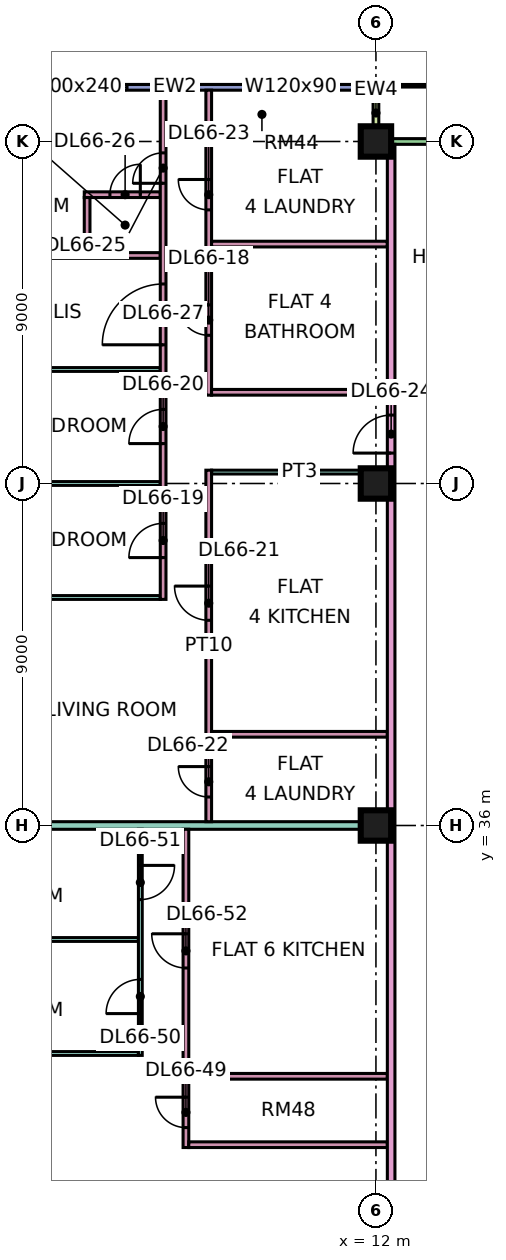
"""IFC4 building model, lengths in metres.
Left out: names, types, materials, properties, quantities, classifications, styles, units other than length and angle.
Written with IfcOpenShell. Run it as: python <this file> out.ifc"""

import sys

from ifc_helpers import new_model, si_unit, direction, frame, frame_2d, origin, origin_2d, place, context, subcontext, project, spatial, rectangle, extrude, element, fill, save


model = new_model("IFC4")
c1 = context("Model", 3, precision=1e-05, world=origin(), true_north=direction((0.0, 1.0)))
c2 = subcontext(c1, "Body", "Model", "MODEL_VIEW")
j1 = project(units=[si_unit("LENGTHUNIT", "METRE"), si_unit("PLANEANGLEUNIT", "RADIAN")], contexts=[c1])
p1 = place(None, origin())
s1 = spatial("IfcSite", under=j1, at=p1, CompositionType="ELEMENT")
p2 = place(p1, origin())
s2 = spatial("IfcBuilding", under=s1, at=p2, CompositionType="ELEMENT")
p3 = place(p2, frame((0.0, 0.0, 284.65)))
s3 = spatial("IfcBuildingStorey", under=s2, at=p3, CompositionType="ELEMENT", Elevation=284.65)
for number, where, z_axis, x_axis in (
    (1, (12.0, 36.0, 0.0), (0.0, 0.0, 1.0), (1.0, 0.0, 0.0)),
    (2, (12.0, 45.0, 0.0), (0.0, 0.0, 1.0), (1.0, 0.0, 0.0)),
    (3, (12.0, 54.0, 0.0), (0.0, 0.0, 1.0), (1.0, 0.0, 0.0)),
):
    element("IfcColumn", number, at=place(p3, frame(where, z_axis=z_axis, x_axis=x_axis)), inside=s3, PredefinedType="COLUMN", context=c2, shape_type="SweptSolid", body=[
        extrude(rectangle(XDim=0.8, YDim=0.8, at=origin_2d()), origin(), (0.0, 0.0, 1.0), 3.75),
    ])
p4 = place(p3, frame((22.425, 54.0, 0.0), z_axis=(0.0, 0.0, 1.0), x_axis=(-1.0, 0.0, 0.0)))
e4 = element("IfcWall", 4, at=p4, inside=s3, PredefinedType="SOLIDWALL", context=c2, shape_type="SweptSolid", body=[
    extrude(rectangle(XDim=10.35, YDim=0.15, at=frame_2d((5.175, 0.0))), origin(), (0.0, 0.0, 1.0), 3.35),
])
p5 = place(p4, frame((1.012, 0.0, 0.45)))
e5 = element("IfcOpeningElement", 5, at=p5, cuts=e4, PredefinedType="OPENING", context=c2, shape_type="SweptSolid", body=[
    extrude(rectangle(XDim=4.8, YDim=2.4, at=frame_2d((2.4, 1.2))), frame((0.0, 0.085, 0.0), z_axis=(0.0, -1.0, 0.0), x_axis=(1.0, 0.0, 0.0)), (0.0, 0.0, 1.0), 0.17),
])
p6 = place(p3, frame((12.0, 55.5, 0.0), z_axis=(0.0, 0.0, 1.0), x_axis=(0.0, -1.0, 0.0)))
e6 = element("IfcWall", 6, at=p6, inside=s3, PredefinedType="SOLIDWALL", context=c2, shape_type="SweptSolid", body=[
    extrude(rectangle(XDim=1.5, YDim=0.15, at=frame_2d((0.75, 0.0))), origin(), (0.0, 0.0, 1.0), 3.35),
])
p7 = place(p3, frame((11.925, 55.425, 0.0), z_axis=(0.0, 0.0, 1.0), x_axis=(-1.0, 0.0, 0.0)))
e7 = element("IfcWall", 7, at=p7, inside=s3, PredefinedType="SOLIDWALL", context=c2, shape_type="SweptSolid", body=[
    extrude(rectangle(XDim=10.425, YDim=0.15, at=frame_2d((5.212, 0.0))), origin(), (0.0, 0.0, 1.0), 3.35),
])
p8 = place(p7, frame((1.562, 0.0, 1.7)))
e8 = element("IfcOpeningElement", 8, at=p8, cuts=e7, PredefinedType="OPENING", context=c2, shape_type="SweptSolid", body=[
    extrude(rectangle(XDim=1.2, YDim=0.9, at=frame_2d((0.6, 0.45))), frame((0.0, 0.085, 0.0), z_axis=(0.0, -1.0, 0.0), x_axis=(1.0, 0.0, 0.0)), (0.0, 0.0, 1.0), 0.17),
])
p9 = place(p7, frame((6.475, 0.0, 0.45)))
e9 = element("IfcOpeningElement", 9, at=p9, cuts=e7, PredefinedType="OPENING", context=c2, shape_type="SweptSolid", body=[
    extrude(rectangle(XDim=3.0, YDim=2.4, at=frame_2d((1.5, 1.2))), frame((0.0, 0.085, 0.0), z_axis=(0.0, -1.0, 0.0), x_axis=(1.0, 0.0, 0.0)), (0.0, 0.0, 1.0), 0.17),
])
p10 = place(p3, frame((-1.351, 33.0, 0.0), z_axis=(0.0, 0.0, 1.0), x_axis=(1.0, 0.0, 0.0)))
e10 = element("IfcWall", 10, at=p10, inside=s3, PredefinedType="PARTITIONING", context=c2, shape_type="SweptSolid", body=[
    extrude(rectangle(XDim=7.101, YDim=0.1, at=frame_2d((3.551, 0.0))), origin(), (0.0, 0.0, 1.0), 3.35),
])
p11 = place(p3, frame((-1.351, 51.0, 0.0), z_axis=(0.0, 0.0, 1.0), x_axis=(1.0, 0.0, 0.0)))
e11 = element("IfcWall", 11, at=p11, inside=s3, PredefinedType="PARTITIONING", context=c2, shape_type="SweptSolid", body=[
    extrude(rectangle(XDim=7.676, YDim=0.15, at=frame_2d((3.838, 0.0))), origin(), (0.0, 0.0, 1.0), 3.35),
])
p12 = place(p3, frame((-1.35, 30.0, 0.0), z_axis=(0.0, 0.0, 1.0), x_axis=(1.0, 0.0, 0.0)))
e12 = element("IfcWall", 12, at=p12, inside=s3, PredefinedType="PARTITIONING", context=c2, shape_type="SweptSolid", body=[
    extrude(rectangle(XDim=7.1, YDim=0.1, at=frame_2d((3.55, 0.0))), origin(), (0.0, 0.0, 1.0), 3.35),
])
p13 = place(p3, frame((0.0, 36.0, 0.0), z_axis=(0.0, 0.0, 1.0), x_axis=(1.0, 0.0, 0.0)))
e13 = element("IfcWall", 13, at=p13, inside=s3, PredefinedType="PARTITIONING", context=c2, shape_type="SweptSolid", body=[
    extrude(rectangle(XDim=12.3, YDim=0.2, at=frame_2d((6.15, 0.0))), origin(), (0.0, 0.0, 1.0), 3.35),
])
p14 = place(p3, frame((0.0, 48.0, 0.0), z_axis=(0.0, 0.0, 1.0), x_axis=(1.0, 0.0, 0.0)))
e14 = element("IfcWall", 14, at=p14, inside=s3, PredefinedType="PARTITIONING", context=c2, shape_type="SweptSolid", body=[
    extrude(rectangle(XDim=6.325, YDim=0.1, at=frame_2d((3.163, 0.0))), origin(), (0.0, 0.0, 1.0), 3.35),
])
for number, where, z_axis, x_axis in (
    (15, (0.074, 42.0, 0.0), (0.0, 0.0, 1.0), (1.0, 0.0, 0.0)),
    (16, (0.074, 45.0, 0.0), (0.0, 0.0, 1.0), (1.0, 0.0, 0.0)),
):
    element("IfcWall", number, at=place(p3, frame(where, z_axis=z_axis, x_axis=x_axis)), inside=s3, PredefinedType="PARTITIONING", context=c2, shape_type="SweptSolid", body=[
        extrude(rectangle(XDim=6.251, YDim=0.1, at=frame_2d((3.125, 0.0))), origin(), (0.0, 0.0, 1.0), 3.35),
    ])
p15 = place(p3, frame((4.325, 52.6, 0.0), z_axis=(0.0, 0.0, 1.0), x_axis=(1.0, 0.0, 0.0)))
e17 = element("IfcWall", 17, at=p15, inside=s3, PredefinedType="PARTITIONING", context=c2, shape_type="SweptSolid", body=[
    extrude(rectangle(XDim=2.0, YDim=0.15, at=frame_2d((1.0, 0.0))), origin(), (0.0, 0.0, 1.0), 3.35),
])
p16 = place(p15, frame((0.675, 0.0, 0.0)))
e18 = element("IfcOpeningElement", 18, at=p16, cuts=e17, PredefinedType="OPENING", context=c2, shape_type="SweptSolid", body=[
    extrude(rectangle(XDim=0.8, YDim=2.1, at=frame_2d((0.4, 1.05))), frame((0.0, 0.085, 0.0), z_axis=(0.0, -1.0, 0.0), x_axis=(1.0, 0.0, 0.0)), (0.0, 0.0, 1.0), 0.17),
])
p17 = place(p3, frame((4.4, 51.075, 0.0), z_axis=(0.0, 0.0, 1.0), x_axis=(0.0, 1.0, 0.0)))
e19 = element("IfcWall", 19, at=p17, inside=s3, PredefinedType="PARTITIONING", context=c2, shape_type="SweptSolid", body=[
    extrude(rectangle(XDim=1.45, YDim=0.15, at=frame_2d((0.725, 0.0))), origin(), (0.0, 0.0, 1.0), 3.35),
])
p18 = place(p3, frame((5.8, 29.95, 0.0), z_axis=(0.0, 0.0, 1.0), x_axis=(0.0, 1.0, 0.0)))
e20 = element("IfcWall", 20, at=p18, inside=s3, PredefinedType="PARTITIONING", context=c2, shape_type="SweptSolid", body=[
    extrude(rectangle(XDim=5.95, YDim=0.1, at=frame_2d((2.975, 0.0))), origin(), (0.0, 0.0, 1.0), 3.35),
])
p19 = place(p18, frame((1.1, 0.0, 0.0)))
e21 = element("IfcOpeningElement", 21, at=p19, cuts=e20, PredefinedType="OPENING", context=c2, shape_type="SweptSolid", body=[
    extrude(rectangle(XDim=0.9, YDim=2.1, at=frame_2d((0.45, 1.05))), frame((0.0, 0.06, 0.0), z_axis=(0.0, -1.0, 0.0), x_axis=(1.0, 0.0, 0.0)), (0.0, 0.0, 1.0), 0.12),
])
p20 = place(p18, frame((4.1, 0.0, 0.0)))
e22 = element("IfcOpeningElement", 22, at=p20, cuts=e20, PredefinedType="OPENING", context=c2, shape_type="SweptSolid", body=[
    extrude(rectangle(XDim=0.9, YDim=2.1, at=frame_2d((0.45, 1.05))), frame((0.0, 0.06, 0.0), z_axis=(0.0, -1.0, 0.0), x_axis=(1.0, 0.0, 0.0)), (0.0, 0.0, 1.0), 0.12),
])
p21 = place(p3, frame((6.4, 41.95, 0.0), z_axis=(0.0, 0.0, 1.0), x_axis=(0.0, 1.0, 0.0)))
e23 = element("IfcWall", 23, at=p21, inside=s3, PredefinedType="PARTITIONING", context=c2, shape_type="SweptSolid", body=[
    extrude(rectangle(XDim=13.4, YDim=0.15, at=frame_2d((6.7, 0.0))), origin(), (0.0, 0.0, 1.0), 3.35),
])
p22 = place(p21, frame((1.1, 0.0, 0.0)))
e24 = element("IfcOpeningElement", 24, at=p22, cuts=e23, PredefinedType="OPENING", context=c2, shape_type="SweptSolid", body=[
    extrude(rectangle(XDim=0.9, YDim=2.1, at=frame_2d((0.45, 1.05))), frame((0.0, 0.085, 0.0), z_axis=(0.0, -1.0, 0.0), x_axis=(1.0, 0.0, 0.0)), (0.0, 0.0, 1.0), 0.17),
])
p23 = place(p21, frame((4.1, 0.0, 0.0)))
e25 = element("IfcOpeningElement", 25, at=p23, cuts=e23, PredefinedType="OPENING", context=c2, shape_type="SweptSolid", body=[
    extrude(rectangle(XDim=0.9, YDim=2.1, at=frame_2d((0.45, 1.05))), frame((0.0, 0.085, 0.0), z_axis=(0.0, -1.0, 0.0), x_axis=(1.0, 0.0, 0.0)), (0.0, 0.0, 1.0), 0.17),
])
p24 = place(p21, frame((10.95, 0.0, 0.0)))
e26 = element("IfcOpeningElement", 26, at=p24, cuts=e23, PredefinedType="OPENING", context=c2, shape_type="SweptSolid", body=[
    extrude(rectangle(XDim=0.8, YDim=2.1, at=frame_2d((0.4, 1.05))), frame((0.0, 0.085, 0.0), z_axis=(0.0, -1.0, 0.0), x_axis=(1.0, 0.0, 0.0)), (0.0, 0.0, 1.0), 0.17),
])
p25 = place(p21, frame((6.7, 0.0, 0.0)))
e27 = element("IfcOpeningElement", 27, at=p25, cuts=e23, PredefinedType="OPENING", context=c2, shape_type="SweptSolid", body=[
    extrude(rectangle(XDim=1.6, YDim=2.1, at=frame_2d((0.8, 1.05))), frame((0.0, 0.085, 0.0), z_axis=(0.0, -1.0, 0.0), x_axis=(1.0, 0.0, 0.0)), (0.0, 0.0, 1.0), 0.17),
])
p26 = place(p3, frame((7.0, 27.525, 0.0), z_axis=(0.0, 0.0, 1.0), x_axis=(0.0, 1.0, 0.0)))
e28 = element("IfcWall", 28, at=p26, inside=s3, PredefinedType="PARTITIONING", context=c2, shape_type="SweptSolid", body=[
    extrude(rectangle(XDim=8.375, YDim=0.15, at=frame_2d((4.188, 0.0))), origin(), (0.0, 0.0, 1.0), 3.35),
])
p27 = place(p26, frame((0.525, 0.0, 0.0)))
e29 = element("IfcOpeningElement", 29, at=p27, cuts=e28, PredefinedType="OPENING", context=c2, shape_type="SweptSolid", body=[
    extrude(rectangle(XDim=0.8, YDim=2.1, at=frame_2d((0.4, 1.05))), frame((0.0, 0.085, 0.0), z_axis=(0.0, -1.0, 0.0), x_axis=(1.0, 0.0, 0.0)), (0.0, 0.0, 1.0), 0.17),
])
p28 = place(p26, frame((4.725, 0.0, 0.0)))
e30 = element("IfcOpeningElement", 30, at=p28, cuts=e28, PredefinedType="OPENING", context=c2, shape_type="SweptSolid", body=[
    extrude(rectangle(XDim=0.9, YDim=2.1, at=frame_2d((0.45, 1.05))), frame((0.0, 0.085, 0.0), z_axis=(0.0, -1.0, 0.0), x_axis=(1.0, 0.0, 0.0)), (0.0, 0.0, 1.0), 0.17),
])
for number, where, z_axis, x_axis in (
    (31, (7.075, 27.6, 0.0), (0.0, 0.0, 1.0), (1.0, 0.0, 0.0)),
    (32, (7.075, 29.4, 0.0), (0.0, 0.0, 1.0), (1.0, 0.0, 0.0)),
):
    element("IfcWall", number, at=place(p3, frame(where, z_axis=z_axis, x_axis=x_axis)), inside=s3, PredefinedType="PARTITIONING", context=c2, shape_type="SweptSolid", body=[
        extrude(rectangle(XDim=5.225, YDim=0.15, at=frame_2d((2.613, 0.0))), origin(), (0.0, 0.0, 1.0), 3.35),
    ])
p29 = place(p3, frame((7.6, 36.1, 0.0), z_axis=(0.0, 0.0, 1.0), x_axis=(0.0, 1.0, 0.0)))
e33 = element("IfcWall", 33, at=p29, inside=s3, PredefinedType="PARTITIONING", context=c2, shape_type="SweptSolid", body=[
    extrude(rectangle(XDim=9.25, YDim=0.15, at=frame_2d((4.625, 0.0))), origin(), (0.0, 0.0, 1.0), 3.35),
])
p30 = place(p29, frame((5.3, 0.0, 0.0)))
e34 = element("IfcOpeningElement", 34, at=p30, cuts=e33, PredefinedType="OPENING", context=c2, shape_type="SweptSolid", body=[
    extrude(rectangle(XDim=0.9, YDim=2.1, at=frame_2d((0.45, 1.05))), frame((0.0, 0.085, 0.0), z_axis=(0.0, -1.0, 0.0), x_axis=(1.0, 0.0, 0.0)), (0.0, 0.0, 1.0), 0.17),
])
p31 = place(p29, frame((0.65, 0.0, 0.0)))
e35 = element("IfcOpeningElement", 35, at=p31, cuts=e33, PredefinedType="OPENING", context=c2, shape_type="SweptSolid", body=[
    extrude(rectangle(XDim=0.8, YDim=2.1, at=frame_2d((0.4, 1.05))), frame((0.0, 0.085, 0.0), z_axis=(0.0, -1.0, 0.0), x_axis=(1.0, 0.0, 0.0)), (0.0, 0.0, 1.0), 0.17),
])
p32 = place(p3, frame((7.6, 47.325, 0.0), z_axis=(0.0, 0.0, 1.0), x_axis=(0.0, 1.0, 0.0)))
e36 = element("IfcWall", 36, at=p32, inside=s3, PredefinedType="PARTITIONING", context=c2, shape_type="SweptSolid", body=[
    extrude(rectangle(XDim=8.025, YDim=0.15, at=frame_2d((4.013, 0.0))), origin(), (0.0, 0.0, 1.0), 3.35),
])
p33 = place(p32, frame((1.575, 0.0, 0.0)))
e37 = element("IfcOpeningElement", 37, at=p33, cuts=e36, PredefinedType="OPENING", context=c2, shape_type="SweptSolid", body=[
    extrude(rectangle(XDim=0.8, YDim=2.1, at=frame_2d((0.4, 1.05))), frame((0.0, 0.085, 0.0), z_axis=(0.0, -1.0, 0.0), x_axis=(1.0, 0.0, 0.0)), (0.0, 0.0, 1.0), 0.17),
])
p34 = place(p32, frame((4.875, 0.0, 0.0)))
e38 = element("IfcOpeningElement", 38, at=p34, cuts=e36, PredefinedType="OPENING", context=c2, shape_type="SweptSolid", body=[
    extrude(rectangle(XDim=0.8, YDim=2.1, at=frame_2d((0.4, 1.05))), frame((0.0, 0.085, 0.0), z_axis=(0.0, -1.0, 0.0), x_axis=(1.0, 0.0, 0.0)), (0.0, 0.0, 1.0), 0.17),
])
p35 = place(p3, frame((7.675, 38.4, 0.0), z_axis=(0.0, 0.0, 1.0), x_axis=(1.0, 0.0, 0.0)))
e39 = element("IfcWall", 39, at=p35, inside=s3, PredefinedType="PARTITIONING", context=c2, shape_type="SweptSolid", body=[
    extrude(rectangle(XDim=4.625, YDim=0.15, at=frame_2d((2.312, 0.0))), origin(), (0.0, 0.0, 1.0), 3.35),
])
p36 = place(p3, frame((7.675, 45.3, 0.0), z_axis=(0.0, 0.0, 1.0), x_axis=(1.0, 0.0, 0.0)))
e40 = element("IfcWall", 40, at=p36, inside=s3, PredefinedType="PARTITIONING", context=c2, shape_type="SweptSolid", body=[
    extrude(rectangle(XDim=4.625, YDim=0.1, at=frame_2d((2.312, 0.0))), origin(), (0.0, 0.0, 1.0), 3.35),
])
for number, where, z_axis, x_axis in (
    (41, (7.675, 47.4, 0.0), (0.0, 0.0, 1.0), (1.0, 0.0, 0.0)),
    (42, (7.675, 51.3, 0.0), (0.0, 0.0, 1.0), (1.0, 0.0, 0.0)),
):
    element("IfcWall", number, at=place(p3, frame(where, z_axis=z_axis, x_axis=x_axis)), inside=s3, PredefinedType="PARTITIONING", context=c2, shape_type="SweptSolid", body=[
        extrude(rectangle(XDim=4.625, YDim=0.15, at=frame_2d((2.312, 0.0))), origin(), (0.0, 0.0, 1.0), 3.35),
    ])
p37 = place(p3, frame((12.4, 20.0, 0.0), z_axis=(0.0, 0.0, 1.0), x_axis=(0.0, 1.0, 0.0)))
e43 = element("IfcWall", 43, at=p37, inside=s3, PredefinedType="PARTITIONING", context=c2, shape_type="SweptSolid", body=[
    extrude(rectangle(XDim=33.926, YDim=0.2, at=frame_2d((16.963, 0.0))), origin(), (0.0, 0.0, 1.0), 3.35),
])
p38 = place(p37, frame((25.8, 0.0, 0.0)))
e44 = element("IfcOpeningElement", 44, at=p38, cuts=e43, PredefinedType="OPENING", context=c2, shape_type="SweptSolid", body=[
    extrude(rectangle(XDim=1.0, YDim=2.1, at=frame_2d((0.5, 1.05))), frame((0.0, 0.11, 0.0), z_axis=(0.0, -1.0, 0.0), x_axis=(1.0, 0.0, 0.0)), (0.0, 0.0, 1.0), 0.22),
])
p39 = place(p37, frame((0.6, 0.0, 0.0)))
e45 = element("IfcOpeningElement", 45, at=p39, cuts=e43, PredefinedType="OPENING", context=c2, shape_type="SweptSolid", body=[
    extrude(rectangle(XDim=1.2, YDim=2.1, at=frame_2d((0.6, 1.05))), frame((0.0, 0.11, 0.0), z_axis=(0.0, -1.0, 0.0), x_axis=(1.0, 0.0, 0.0)), (0.0, 0.0, 1.0), 0.22),
])
p40 = place(p37, frame((4.5, 0.0, 0.0)))
e46 = element("IfcOpeningElement", 46, at=p40, cuts=e43, PredefinedType="OPENING", context=c2, shape_type="SweptSolid", body=[
    extrude(rectangle(XDim=1.0, YDim=2.1, at=frame_2d((0.5, 1.05))), frame((0.0, 0.11, 0.0), z_axis=(0.0, -1.0, 0.0), x_axis=(1.0, 0.0, 0.0)), (0.0, 0.0, 1.0), 0.22),
])
p41 = place(p8, origin())
e47 = element("IfcWindow", 47, at=p41, inside=s3, PartitioningType="SINGLE_PANEL", PredefinedType="WINDOW", context=c2, shape_type="SweptSolid", body=[
    extrude(rectangle(XDim=1.2, YDim=0.9, at=frame_2d((0.6, 0.45))), frame((0.0, 0.03, 0.0), z_axis=(0.0, -1.0, 0.0), x_axis=(1.0, 0.0, 0.0)), (0.0, 0.0, 1.0), 0.06),
])
fill(e8, e47)
p42 = place(p9, origin())
e48 = element("IfcWindow", 48, at=p42, inside=s3, PartitioningType="SINGLE_PANEL", PredefinedType="WINDOW", context=c2, shape_type="SweptSolid", body=[
    extrude(rectangle(XDim=3.0, YDim=2.4, at=frame_2d((1.5, 1.2))), frame((0.0, 0.03, 0.0), z_axis=(0.0, -1.0, 0.0), x_axis=(1.0, 0.0, 0.0)), (0.0, 0.0, 1.0), 0.06),
])
fill(e9, e48)
p43 = place(p33, frame((0.8, 0.0, 0.0), z_axis=(0.0, 0.0, 1.0), x_axis=(-1.0, 0.0, 0.0)))
e49 = element("IfcDoor", 49, at=p43, inside=s3, OperationType="SINGLE_SWING_RIGHT", PredefinedType="DOOR", context=c2, shape_type="SweptSolid", body=[
    extrude(rectangle(XDim=0.8, YDim=2.1, at=frame_2d((0.4, 1.05))), frame((0.0, 0.025, 0.0), z_axis=(0.0, -1.0, 0.0), x_axis=(1.0, 0.0, 0.0)), (0.0, 0.0, 1.0), 0.05),
])
fill(e37, e49)
p44 = place(p22, origin())
e50 = element("IfcDoor", 50, at=p44, inside=s3, OperationType="SINGLE_SWING_LEFT", PredefinedType="DOOR", context=c2, shape_type="SweptSolid", body=[
    extrude(rectangle(XDim=0.9, YDim=2.1, at=frame_2d((0.45, 1.05))), frame((0.0, 0.025, 0.0), z_axis=(0.0, -1.0, 0.0), x_axis=(1.0, 0.0, 0.0)), (0.0, 0.0, 1.0), 0.05),
])
fill(e24, e50)
p45 = place(p23, origin())
e51 = element("IfcDoor", 51, at=p45, inside=s3, OperationType="SINGLE_SWING_LEFT", PredefinedType="DOOR", context=c2, shape_type="SweptSolid", body=[
    extrude(rectangle(XDim=0.9, YDim=2.1, at=frame_2d((0.45, 1.05))), frame((0.0, 0.025, 0.0), z_axis=(0.0, -1.0, 0.0), x_axis=(1.0, 0.0, 0.0)), (0.0, 0.0, 1.0), 0.05),
])
fill(e25, e51)
p46 = place(p30, frame((0.9, 0.0, 0.0), z_axis=(0.0, 0.0, 1.0), x_axis=(-1.0, 0.0, 0.0)))
e52 = element("IfcDoor", 52, at=p46, inside=s3, OperationType="SINGLE_SWING_RIGHT", PredefinedType="DOOR", context=c2, shape_type="SweptSolid", body=[
    extrude(rectangle(XDim=0.9, YDim=2.1, at=frame_2d((0.45, 1.05))), frame((0.0, 0.025, 0.0), z_axis=(0.0, -1.0, 0.0), x_axis=(1.0, 0.0, 0.0)), (0.0, 0.0, 1.0), 0.05),
])
fill(e34, e52)
p47 = place(p31, frame((0.8, 0.0, 0.0), z_axis=(0.0, 0.0, 1.0), x_axis=(-1.0, 0.0, 0.0)))
e53 = element("IfcDoor", 53, at=p47, inside=s3, OperationType="SINGLE_SWING_RIGHT", PredefinedType="DOOR", context=c2, shape_type="SweptSolid", body=[
    extrude(rectangle(XDim=0.8, YDim=2.1, at=frame_2d((0.4, 1.05))), frame((0.0, 0.025, 0.0), z_axis=(0.0, -1.0, 0.0), x_axis=(1.0, 0.0, 0.0)), (0.0, 0.0, 1.0), 0.05),
])
fill(e35, e53)
p48 = place(p34, frame((0.8, 0.0, 0.0), z_axis=(0.0, 0.0, 1.0), x_axis=(-1.0, 0.0, 0.0)))
e54 = element("IfcDoor", 54, at=p48, inside=s3, OperationType="SINGLE_SWING_RIGHT", PredefinedType="DOOR", context=c2, shape_type="SweptSolid", body=[
    extrude(rectangle(XDim=0.8, YDim=2.1, at=frame_2d((0.4, 1.05))), frame((0.0, 0.025, 0.0), z_axis=(0.0, -1.0, 0.0), x_axis=(1.0, 0.0, 0.0)), (0.0, 0.0, 1.0), 0.05),
])
fill(e38, e54)
p49 = place(p38, origin())
e55 = element("IfcDoor", 55, at=p49, inside=s3, OperationType="SINGLE_SWING_LEFT", PredefinedType="DOOR", context=c2, shape_type="SweptSolid", body=[
    extrude(rectangle(XDim=1.0, YDim=2.1, at=frame_2d((0.5, 1.05))), frame((0.0, 0.025, 0.0), z_axis=(0.0, -1.0, 0.0), x_axis=(1.0, 0.0, 0.0)), (0.0, 0.0, 1.0), 0.05),
])
fill(e44, e55)
p50 = place(p24, origin())
e56 = element("IfcDoor", 56, at=p50, inside=s3, OperationType="SINGLE_SWING_LEFT", PredefinedType="DOOR", context=c2, shape_type="SweptSolid", body=[
    extrude(rectangle(XDim=0.8, YDim=2.1, at=frame_2d((0.4, 1.05))), frame((0.0, 0.025, 0.0), z_axis=(0.0, -1.0, 0.0), x_axis=(1.0, 0.0, 0.0)), (0.0, 0.0, 1.0), 0.05),
])
fill(e26, e56)
p51 = place(p16, frame((0.8, 0.0, 0.0), z_axis=(0.0, 0.0, 1.0), x_axis=(-1.0, 0.0, 0.0)))
e57 = element("IfcDoor", 57, at=p51, inside=s3, OperationType="SINGLE_SWING_RIGHT", PredefinedType="DOOR", context=c2, shape_type="SweptSolid", body=[
    extrude(rectangle(XDim=0.8, YDim=2.1, at=frame_2d((0.4, 1.05))), frame((0.0, 0.025, 0.0), z_axis=(0.0, -1.0, 0.0), x_axis=(1.0, 0.0, 0.0)), (0.0, 0.0, 1.0), 0.05),
])
fill(e18, e57)
p52 = place(p25, origin())
e58 = element("IfcDoor", 58, at=p52, inside=s3, OperationType="DOUBLE_DOOR_SINGLE_SWING", PredefinedType="DOOR", context=c2, shape_type="SweptSolid", body=[
    extrude(rectangle(XDim=1.6, YDim=2.1, at=frame_2d((0.8, 1.05))), frame((0.0, 0.025, 0.0), z_axis=(0.0, -1.0, 0.0), x_axis=(1.0, 0.0, 0.0)), (0.0, 0.0, 1.0), 0.05),
])
fill(e27, e58)
p53 = place(p27, frame((0.8, 0.0, 0.0), z_axis=(0.0, 0.0, 1.0), x_axis=(-1.0, 0.0, 0.0)))
e59 = element("IfcDoor", 59, at=p53, inside=s3, OperationType="SINGLE_SWING_RIGHT", PredefinedType="DOOR", context=c2, shape_type="SweptSolid", body=[
    extrude(rectangle(XDim=0.8, YDim=2.1, at=frame_2d((0.4, 1.05))), frame((0.0, 0.025, 0.0), z_axis=(0.0, -1.0, 0.0), x_axis=(1.0, 0.0, 0.0)), (0.0, 0.0, 1.0), 0.05),
])
fill(e29, e59)
p54 = place(p19, origin())
e60 = element("IfcDoor", 60, at=p54, inside=s3, OperationType="SINGLE_SWING_LEFT", PredefinedType="DOOR", context=c2, shape_type="SweptSolid", body=[
    extrude(rectangle(XDim=0.9, YDim=2.1, at=frame_2d((0.45, 1.05))), frame((0.0, 0.025, 0.0), z_axis=(0.0, -1.0, 0.0), x_axis=(1.0, 0.0, 0.0)), (0.0, 0.0, 1.0), 0.05),
])
fill(e21, e60)
p55 = place(p20, origin())
e61 = element("IfcDoor", 61, at=p55, inside=s3, OperationType="SINGLE_SWING_RIGHT", PredefinedType="DOOR", context=c2, shape_type="SweptSolid", body=[
    extrude(rectangle(XDim=0.9, YDim=2.1, at=frame_2d((0.45, 1.05))), frame((0.0, 0.025, 0.0), z_axis=(0.0, -1.0, 0.0), x_axis=(1.0, 0.0, 0.0)), (0.0, 0.0, 1.0), 0.05),
])
fill(e22, e61)
p56 = place(p28, frame((0.9, 0.0, 0.0), z_axis=(0.0, 0.0, 1.0), x_axis=(-1.0, 0.0, 0.0)))
e62 = element("IfcDoor", 62, at=p56, inside=s3, OperationType="SINGLE_SWING_RIGHT", PredefinedType="DOOR", context=c2, shape_type="SweptSolid", body=[
    extrude(rectangle(XDim=0.9, YDim=2.1, at=frame_2d((0.45, 1.05))), frame((0.0, 0.025, 0.0), z_axis=(0.0, -1.0, 0.0), x_axis=(1.0, 0.0, 0.0)), (0.0, 0.0, 1.0), 0.05),
])
fill(e30, e62)
save(model, sys.argv[1])
